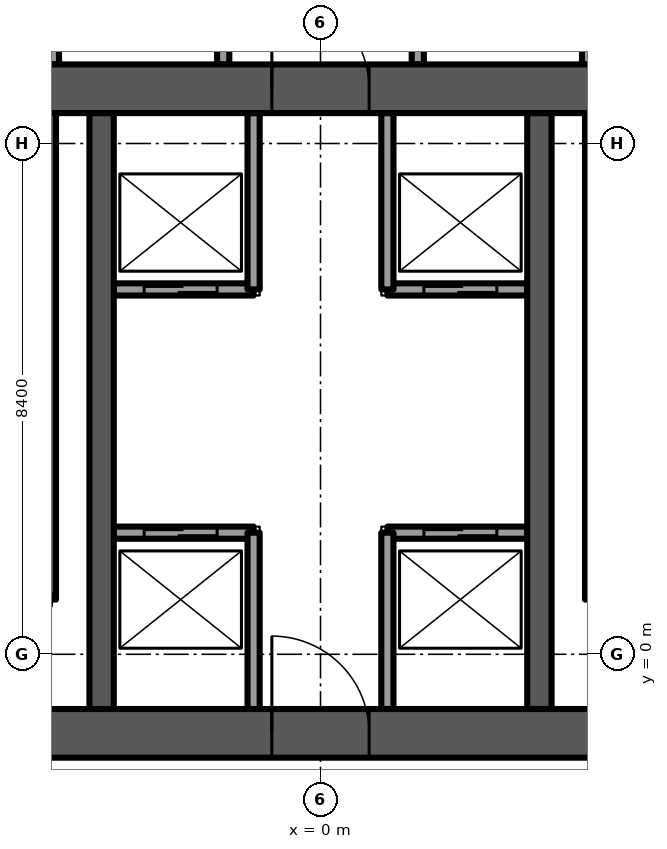
"""IFC4 building model, lengths in metres.
Left out: names, types, materials, properties, quantities, classifications, styles, units other than length and angle.
Written with IfcOpenShell. Run it as: python <this file> out.ifc"""

import sys

from ifc_helpers import new_model, si_unit, direction, frame, frame_2d, origin, place, context, subcontext, project, spatial, rectangle, extrude, element, fill, save


model = new_model("IFC4")
c1 = context("Model", 3, precision=1e-05, world=origin(), true_north=direction((0.0, 1.0)))
c2 = subcontext(c1, "Body", "Model", "MODEL_VIEW")
j1 = project(units=[si_unit("LENGTHUNIT", "METRE"), si_unit("PLANEANGLEUNIT", "RADIAN")], contexts=[c1])
p1 = place(None, origin())
s1 = spatial("IfcSite", under=j1, at=p1, CompositionType="ELEMENT")
p2 = place(p1, origin())
s2 = spatial("IfcBuilding", under=s1, at=p2, CompositionType="ELEMENT")
p3 = place(p2, frame((0.0, 0.0, 202.0)))
s3 = spatial("IfcBuildingStorey", under=s2, at=p3, CompositionType="ELEMENT", Elevation=202.0)
p4 = place(p3, frame((-8.5, -1.3, -0.3), z_axis=(0.0, 0.0, 1.0), x_axis=(1.0, 0.0, 0.0)))
e1 = element("IfcWall", 1, at=p4, inside=s3, PredefinedType="SHEAR", context=c2, shape_type="SweptSolid", body=[
    extrude(rectangle(XDim=17.0, YDim=0.8, at=frame_2d((8.5, 0.0))), origin(), (0.0, 0.0, 1.0), 3.75),
])
p5 = place(p4, frame((7.7, 0.0, 0.0)))
e2 = element("IfcOpeningElement", 2, at=p5, cuts=e1, PredefinedType="OPENING", context=c2, shape_type="SweptSolid", body=[
    extrude(rectangle(XDim=1.6, YDim=2.1, at=frame_2d((0.8, 1.05))), frame((0.0, 0.4, 0.0), z_axis=(0.0, -1.0, 0.0), x_axis=(1.0, 0.0, 0.0)), (0.0, 0.0, 1.0), 0.8),
])
p6 = place(p3, frame((-8.5, 9.3, -0.3), z_axis=(0.0, 0.0, 1.0), x_axis=(1.0, 0.0, 0.0)))
e3 = element("IfcWall", 3, at=p6, inside=s3, PredefinedType="SHEAR", context=c2, shape_type="SweptSolid", body=[
    extrude(rectangle(XDim=17.0, YDim=0.8, at=frame_2d((8.5, 0.0))), origin(), (0.0, 0.0, 1.0), 3.75),
])
p7 = place(p6, frame((7.7, 0.0, 0.0)))
e4 = element("IfcOpeningElement", 4, at=p7, cuts=e3, PredefinedType="OPENING", context=c2, shape_type="SweptSolid", body=[
    extrude(rectangle(XDim=1.6, YDim=2.1, at=frame_2d((0.8, 1.05))), frame((0.0, 0.4, 0.0), z_axis=(0.0, -1.0, 0.0), x_axis=(1.0, 0.0, 0.0)), (0.0, 0.0, 1.0), 0.8),
])
p8 = place(p6, frame((1.75, 0.0, 0.0)))
e5 = element("IfcOpeningElement", 5, at=p8, cuts=e3, PredefinedType="OPENING", context=c2, shape_type="SweptSolid", body=[
    extrude(rectangle(XDim=1.1, YDim=2.1, at=frame_2d((0.55, 1.05))), frame((0.0, 0.4, 0.0), z_axis=(0.0, -1.0, 0.0), x_axis=(1.0, 0.0, 0.0)), (0.0, 0.0, 1.0), 0.8),
])
p9 = place(p6, frame((14.15, 0.0, 0.0)))
e6 = element("IfcOpeningElement", 6, at=p9, cuts=e3, PredefinedType="OPENING", context=c2, shape_type="SweptSolid", body=[
    extrude(rectangle(XDim=1.1, YDim=2.1, at=frame_2d((0.55, 1.05))), frame((0.0, 0.4, 0.0), z_axis=(0.0, -1.0, 0.0), x_axis=(1.0, 0.0, 0.0)), (0.0, 0.0, 1.0), 0.8),
])
for number, where, z_axis, x_axis in (
    (7, (-3.6, -0.9, -0.3), (0.0, 0.0, 1.0), (0.0, 1.0, 0.0)),
    (8, (3.6, -0.9, -0.3), (0.0, 0.0, 1.0), (0.0, 1.0, 0.0)),
):
    element("IfcWall", number, at=place(p3, frame(where, z_axis=z_axis, x_axis=x_axis)), inside=s3, PredefinedType="SHEAR", context=c2, shape_type="SweptSolid", body=[
        extrude(rectangle(XDim=9.8, YDim=0.4, at=frame_2d((4.9, 0.0))), origin(), (0.0, 0.0, 1.0), 3.75),
    ])
p10 = place(p3, frame((-3.4, 2.0, 0.0), z_axis=(0.0, 0.0, 1.0), x_axis=(1.0, 0.0, 0.0)))
e9 = element("IfcWall", 9, at=p10, inside=s3, PredefinedType="PARTITIONING", context=c2, shape_type="SweptSolid", body=[
    extrude(rectangle(XDim=2.3, YDim=0.2, at=frame_2d((1.15, 0.0))), origin(), (0.0, 0.0, 1.0), 3.45),
])
p11 = place(p10, frame((0.5, 0.0, 0.0)))
e10 = element("IfcOpeningElement", 10, at=p11, cuts=e9, PredefinedType="OPENING", context=c2, shape_type="SweptSolid", body=[
    extrude(rectangle(XDim=1.2, YDim=2.1, at=frame_2d((0.6, 1.05))), frame((0.0, 0.1, 0.0), z_axis=(0.0, -1.0, 0.0), x_axis=(1.0, 0.0, 0.0)), (0.0, 0.0, 1.0), 0.2),
])
p12 = place(p3, frame((-3.4, 6.0, 0.0), z_axis=(0.0, 0.0, 1.0), x_axis=(1.0, 0.0, 0.0)))
e11 = element("IfcWall", 11, at=p12, inside=s3, PredefinedType="PARTITIONING", context=c2, shape_type="SweptSolid", body=[
    extrude(rectangle(XDim=2.3, YDim=0.2, at=frame_2d((1.15, 0.0))), origin(), (0.0, 0.0, 1.0), 3.45),
])
p13 = place(p12, frame((0.5, 0.0, 0.0)))
e12 = element("IfcOpeningElement", 12, at=p13, cuts=e11, PredefinedType="OPENING", context=c2, shape_type="SweptSolid", body=[
    extrude(rectangle(XDim=1.2, YDim=2.1, at=frame_2d((0.6, 1.05))), frame((0.0, 0.1, 0.0), z_axis=(0.0, -1.0, 0.0), x_axis=(1.0, 0.0, 0.0)), (0.0, 0.0, 1.0), 0.2),
])
p14 = place(p3, frame((1.1, 2.0, 0.0), z_axis=(0.0, 0.0, 1.0), x_axis=(1.0, 0.0, 0.0)))
e13 = element("IfcWall", 13, at=p14, inside=s3, PredefinedType="PARTITIONING", context=c2, shape_type="SweptSolid", body=[
    extrude(rectangle(XDim=2.3, YDim=0.2, at=frame_2d((1.15, 0.0))), origin(), (0.0, 0.0, 1.0), 3.45),
])
p15 = place(p14, frame((0.6, 0.0, 0.0)))
e14 = element("IfcOpeningElement", 14, at=p15, cuts=e13, PredefinedType="OPENING", context=c2, shape_type="SweptSolid", body=[
    extrude(rectangle(XDim=1.2, YDim=2.1, at=frame_2d((0.6, 1.05))), frame((0.0, 0.1, 0.0), z_axis=(0.0, -1.0, 0.0), x_axis=(1.0, 0.0, 0.0)), (0.0, 0.0, 1.0), 0.2),
])
p16 = place(p3, frame((1.1, 6.0, 0.0), z_axis=(0.0, 0.0, 1.0), x_axis=(1.0, 0.0, 0.0)))
e15 = element("IfcWall", 15, at=p16, inside=s3, PredefinedType="PARTITIONING", context=c2, shape_type="SweptSolid", body=[
    extrude(rectangle(XDim=2.3, YDim=0.2, at=frame_2d((1.15, 0.0))), origin(), (0.0, 0.0, 1.0), 3.45),
])
p17 = place(p16, frame((0.6, 0.0, 0.0)))
e16 = element("IfcOpeningElement", 16, at=p17, cuts=e15, PredefinedType="OPENING", context=c2, shape_type="SweptSolid", body=[
    extrude(rectangle(XDim=1.2, YDim=2.1, at=frame_2d((0.6, 1.05))), frame((0.0, 0.1, 0.0), z_axis=(0.0, -1.0, 0.0), x_axis=(1.0, 0.0, 0.0)), (0.0, 0.0, 1.0), 0.2),
])
for number, where, z_axis, x_axis in (
    (17, (-1.1, -0.9, 0.0), (0.0, 0.0, 1.0), (0.0, 1.0, 0.0)),
    (18, (1.1, -0.9, 0.0), (0.0, 0.0, 1.0), (0.0, 1.0, 0.0)),
    (19, (-1.1, 6.0, 0.0), (0.0, 0.0, 1.0), (0.0, 1.0, 0.0)),
    (20, (1.1, 6.0, 0.0), (0.0, 0.0, 1.0), (0.0, 1.0, 0.0)),
):
    element("IfcWall", number, at=place(p3, frame(where, z_axis=z_axis, x_axis=x_axis)), inside=s3, PredefinedType="PARTITIONING", context=c2, shape_type="SweptSolid", body=[
        extrude(rectangle(XDim=2.9, YDim=0.2, at=frame_2d((1.45, 0.0))), origin(), (0.0, 0.0, 1.0), 3.45),
    ])
for number, where, z_axis, x_axis in (
    (21, (-4.45, 0.9, -0.3), (0.0, 0.0, 1.0), (0.0, 1.0, 0.0)),
    (22, (4.45, 0.9, -0.3), (0.0, 0.0, 1.0), (0.0, 1.0, 0.0)),
):
    element("IfcWall", number, at=place(p3, frame(where, z_axis=z_axis, x_axis=x_axis)), inside=s3, PredefinedType="SOLIDWALL", context=c2, shape_type="SweptSolid", body=[
        extrude(rectangle(XDim=8.0, YDim=0.2, at=frame_2d((4.0, 0.0))), origin(), (0.0, 0.0, 1.0), 3.75),
    ])
p18 = place(p3, frame((-4.4, 9.7, 0.0), z_axis=(0.0, 0.0, 1.0), x_axis=(0.0, 1.0, 0.0)))
e23 = element("IfcWall", 23, at=p18, inside=s3, PredefinedType="PARTITIONING", context=c2, shape_type="SweptSolid", body=[
    extrude(rectangle(XDim=3.9, YDim=0.2, at=frame_2d((1.95, 0.0))), origin(), (0.0, 0.0, 1.0), 3.45),
])
p19 = place(p18, frame((1.35, 0.0, 0.0)))
e24 = element("IfcOpeningElement", 24, at=p19, cuts=e23, PredefinedType="OPENING", context=c2, shape_type="SweptSolid", body=[
    extrude(rectangle(XDim=1.2, YDim=2.1, at=frame_2d((0.6, 1.05))), frame((0.0, 0.1, 0.0), z_axis=(0.0, -1.0, 0.0), x_axis=(1.0, 0.0, 0.0)), (0.0, 0.0, 1.0), 0.2),
])
p20 = place(p3, frame((4.4, 9.7, 0.0), z_axis=(0.0, 0.0, 1.0), x_axis=(0.0, 1.0, 0.0)))
e25 = element("IfcWall", 25, at=p20, inside=s3, PredefinedType="PARTITIONING", context=c2, shape_type="SweptSolid", body=[
    extrude(rectangle(XDim=3.9, YDim=0.2, at=frame_2d((1.95, 0.0))), origin(), (0.0, 0.0, 1.0), 3.45),
])
p21 = place(p20, frame((1.35, 0.0, 0.0)))
e26 = element("IfcOpeningElement", 26, at=p21, cuts=e25, PredefinedType="OPENING", context=c2, shape_type="SweptSolid", body=[
    extrude(rectangle(XDim=1.2, YDim=2.1, at=frame_2d((0.6, 1.05))), frame((0.0, 0.1, 0.0), z_axis=(0.0, -1.0, 0.0), x_axis=(1.0, 0.0, 0.0)), (0.0, 0.0, 1.0), 0.2),
])
for number, where, z_axis, x_axis in (
    (27, (-1.6, 9.7, 0.0), (0.0, 0.0, 1.0), (0.0, 1.0, 0.0)),
    (28, (1.6, 9.7, 0.0), (0.0, 0.0, 1.0), (0.0, 1.0, 0.0)),
):
    element("IfcWall", number, at=place(p3, frame(where, z_axis=z_axis, x_axis=x_axis)), inside=s3, PredefinedType="PARTITIONING", context=c2, shape_type="SweptSolid", body=[
        extrude(rectangle(XDim=3.9, YDim=0.2, at=frame_2d((1.95, 0.0))), origin(), (0.0, 0.0, 1.0), 3.45),
    ])
p22 = place(p11, origin())
e29 = element("IfcDoor", 29, at=p22, inside=s3, OperationType="SLIDING_TO_LEFT", PredefinedType="DOOR", context=c2, shape_type="SweptSolid", body=[
    extrude(rectangle(XDim=1.2, YDim=2.1, at=frame_2d((0.6, 1.05))), frame((0.0, 0.025, 0.0), z_axis=(0.0, -1.0, 0.0), x_axis=(1.0, 0.0, 0.0)), (0.0, 0.0, 1.0), 0.05),
])
fill(e10, e29)
p23 = place(p15, origin())
e30 = element("IfcDoor", 30, at=p23, inside=s3, OperationType="SLIDING_TO_LEFT", PredefinedType="DOOR", context=c2, shape_type="SweptSolid", body=[
    extrude(rectangle(XDim=1.2, YDim=2.1, at=frame_2d((0.6, 1.05))), frame((0.0, 0.025, 0.0), z_axis=(0.0, -1.0, 0.0), x_axis=(1.0, 0.0, 0.0)), (0.0, 0.0, 1.0), 0.05),
])
fill(e14, e30)
p24 = place(p13, origin())
e31 = element("IfcDoor", 31, at=p24, inside=s3, OperationType="SLIDING_TO_LEFT", PredefinedType="DOOR", context=c2, shape_type="SweptSolid", body=[
    extrude(rectangle(XDim=1.2, YDim=2.1, at=frame_2d((0.6, 1.05))), frame((0.0, 0.025, 0.0), z_axis=(0.0, -1.0, 0.0), x_axis=(1.0, 0.0, 0.0)), (0.0, 0.0, 1.0), 0.05),
])
fill(e12, e31)
p25 = place(p17, origin())
e32 = element("IfcDoor", 32, at=p25, inside=s3, OperationType="SLIDING_TO_LEFT", PredefinedType="DOOR", context=c2, shape_type="SweptSolid", body=[
    extrude(rectangle(XDim=1.2, YDim=2.1, at=frame_2d((0.6, 1.05))), frame((0.0, 0.025, 0.0), z_axis=(0.0, -1.0, 0.0), x_axis=(1.0, 0.0, 0.0)), (0.0, 0.0, 1.0), 0.05),
])
fill(e16, e32)
p26 = place(p5, origin())
e33 = element("IfcDoor", 33, at=p26, inside=s3, OperationType="DOUBLE_DOOR_SINGLE_SWING", PredefinedType="DOOR", context=c2, shape_type="SweptSolid", body=[
    extrude(rectangle(XDim=1.6, YDim=2.1, at=frame_2d((0.8, 1.05))), frame((0.0, 0.025, 0.0), z_axis=(0.0, -1.0, 0.0), x_axis=(1.0, 0.0, 0.0)), (0.0, 0.0, 1.0), 0.05),
])
fill(e2, e33)
p27 = place(p7, origin())
e34 = element("IfcDoor", 34, at=p27, inside=s3, OperationType="DOUBLE_DOOR_SINGLE_SWING", PredefinedType="DOOR", context=c2, shape_type="SweptSolid", body=[
    extrude(rectangle(XDim=1.6, YDim=2.1, at=frame_2d((0.8, 1.05))), frame((0.0, 0.025, 0.0), z_axis=(0.0, -1.0, 0.0), x_axis=(1.0, 0.0, 0.0)), (0.0, 0.0, 1.0), 0.05),
])
fill(e4, e34)
save(model, sys.argv[1])
